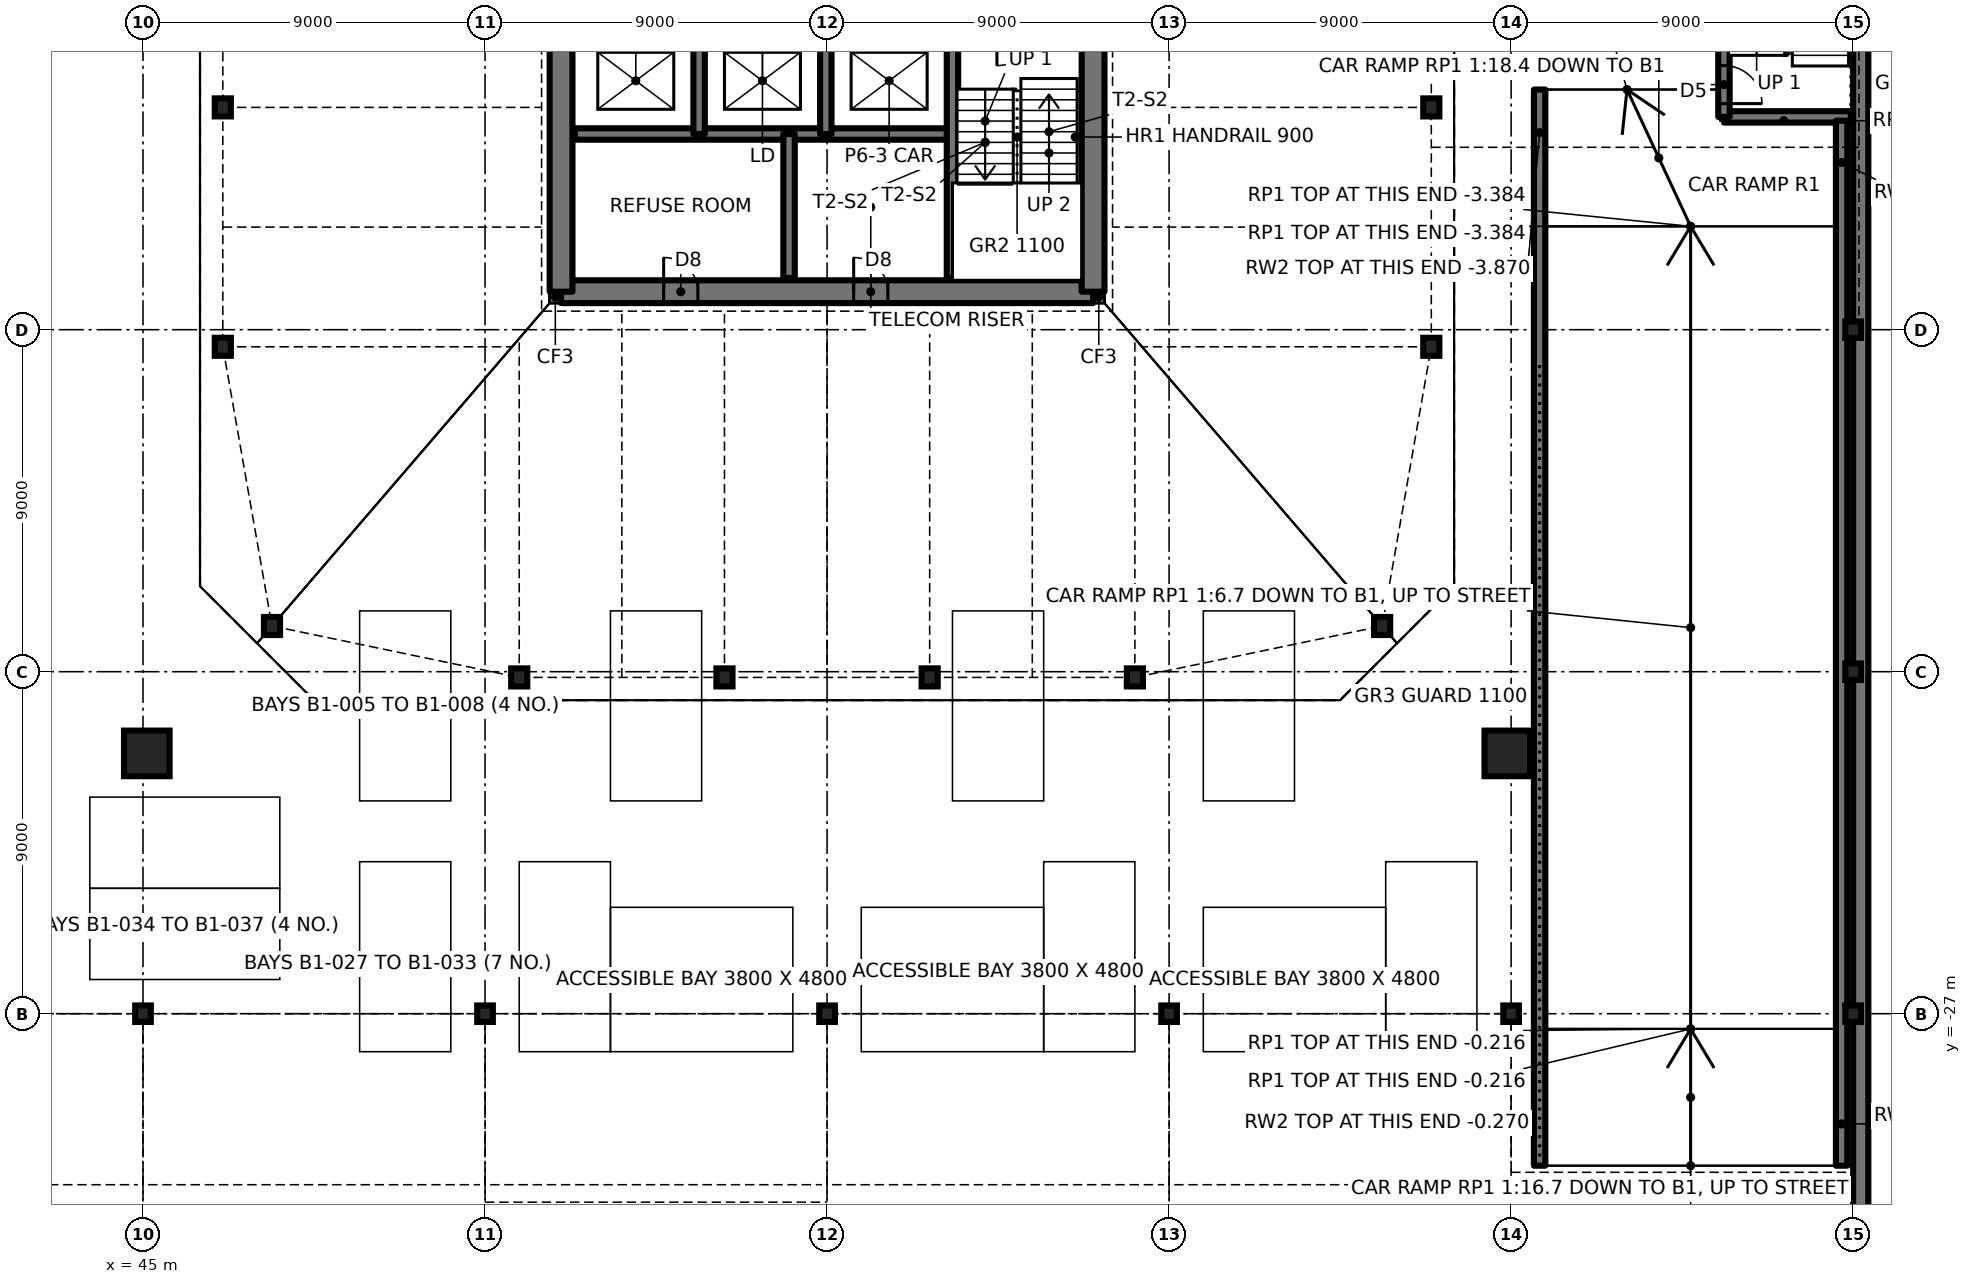
"""IFC4 building model, lengths in metres.
Left out: names, types, materials, properties, quantities, classifications, styles, units other than length and angle.
Written with IfcOpenShell. Run it as: python <this file> out.ifc"""

import sys

from ifc_helpers import new_model, si_unit, direction, frame, frame_2d, origin, origin_2d, place, context, subcontext, project, spatial, polyline, rectangle, hollow_rectangle, i_section, outline, extrude, element, fill, save


model = new_model("IFC4")
c1 = context("Model", 3, precision=1e-05, world=origin(), true_north=direction((0.0, 1.0)))
c2 = subcontext(c1, "Body", "Model", "MODEL_VIEW")
j1 = project(units=[si_unit("LENGTHUNIT", "METRE"), si_unit("PLANEANGLEUNIT", "RADIAN")], contexts=[c1])
p1 = place(None, origin())
s1 = spatial("IfcSite", under=j1, at=p1, CompositionType="ELEMENT")
p2 = place(p1, origin())
s2 = spatial("IfcBuilding", under=s1, at=p2, CompositionType="ELEMENT")
p3 = place(p2, frame((0.0, 0.0, -3.6)))
s3 = spatial("IfcBuildingStorey", under=s2, at=p3, CompositionType="ELEMENT", Elevation=-3.6)
for number, where, z_axis, x_axis in (
    (1, (48.394, -16.797, 0.0), (0.0, 0.0, 1.0), (1.0, 0.0, 0.0)),
    (2, (54.9, -18.15, 0.0), (0.0, 0.0, 1.0), (1.0, 0.0, 0.0)),
    (3, (60.3, -18.15, 0.0), (0.0, 0.0, 1.0), (1.0, 0.0, 0.0)),
    (4, (65.7, -18.15, 0.0), (0.0, 0.0, 1.0), (1.0, 0.0, 0.0)),
    (5, (71.1, -18.15, 0.0), (0.0, 0.0, 1.0), (1.0, 0.0, 0.0)),
    (6, (77.606, -16.797, 0.0), (0.0, 0.0, 1.0), (1.0, 0.0, 0.0)),
    (7, (78.9, -9.45, 0.0), (0.0, 0.0, 1.0), (1.0, 0.0, 0.0)),
    (8, (78.9, -3.15, 0.0), (0.0, 0.0, 1.0), (1.0, 0.0, 0.0)),
    (9, (47.1, -3.15, 0.0), (0.0, 0.0, 1.0), (1.0, 0.0, 0.0)),
    (10, (47.1, -9.45, 0.0), (0.0, 0.0, 1.0), (1.0, 0.0, 0.0)),
):
    element("IfcColumn", number, at=place(p3, frame(where, z_axis=z_axis, x_axis=x_axis)), inside=s3, PredefinedType="COLUMN", context=c2, shape_type="SweptSolid", body=[
        extrude(i_section(OverallWidth=0.424, OverallDepth=0.475, WebThickness=0.048, FlangeThickness=0.077, at=origin_2d()), origin(), (0.0, 0.0, 1.0), 3.6),
    ])
for number, where, z_axis, x_axis in (
    (11, (45.1, -20.15, 0.0), (0.0, 0.0, 1.0), (1.0, 0.0, 0.0)),
    (12, (80.9, -20.15, 0.0), (0.0, 0.0, 1.0), (1.0, 0.0, 0.0)),
):
    element("IfcColumn", number, at=place(p3, frame(where, z_axis=z_axis, x_axis=x_axis)), inside=s3, PredefinedType="COLUMN", context=c2, shape_type="SweptSolid", body=[
        extrude(hollow_rectangle(XDim=1.2, YDim=1.2, WallThickness=0.07, at=origin_2d()), origin(), (0.0, 0.0, 1.0), 3.6),
    ])
for number, where, z_axis, x_axis in (
    (13, (45.0, -27.0, 0.0), (0.0, 0.0, 1.0), (1.0, 0.0, 0.0)),
    (14, (54.0, -27.0, 0.0), (0.0, 0.0, 1.0), (1.0, 0.0, 0.0)),
    (15, (63.0, -27.0, 0.0), (0.0, 0.0, 1.0), (1.0, 0.0, 0.0)),
    (16, (72.0, -27.0, 0.0), (0.0, 0.0, 1.0), (1.0, 0.0, 0.0)),
    (17, (81.0, -27.0, 0.0), (0.0, 0.0, 1.0), (1.0, 0.0, 0.0)),
    (18, (90.0, -27.0, 0.0), (0.0, 0.0, 1.0), (1.0, 0.0, 0.0)),
    (19, (90.0, -18.0, 0.0), (0.0, 0.0, 1.0), (1.0, 0.0, 0.0)),
    (20, (90.0, -9.0, 0.0), (0.0, 0.0, 1.0), (1.0, 0.0, 0.0)),
):
    element("IfcColumn", number, at=place(p3, frame(where, z_axis=z_axis, x_axis=x_axis)), inside=s3, PredefinedType="COLUMN", context=c2, shape_type="SweptSolid", body=[
        extrude(i_section(OverallWidth=0.411, OverallDepth=0.434, WebThickness=0.036, FlangeThickness=0.057, at=origin_2d()), origin(), (0.0, 0.0, 1.0), 3.6),
    ])
for number, where, z_axis, x_axis in (
    (21, (55.7, -8.15, 0.0), (0.0, 0.0, 1.0), (1.0, 0.0, 0.0)),
    (22, (70.0, -8.15, 0.0), (0.0, 0.0, 1.0), (1.0, 0.0, 0.0)),
):
    element("IfcWall", number, at=place(p3, frame(where, z_axis=z_axis, x_axis=x_axis)), inside=s3, PredefinedType="SOLIDWALL", context=c2, shape_type="SweptSolid", body=[
        extrude(rectangle(XDim=0.3, YDim=0.3, at=frame_2d((0.15, 0.0))), origin(), (0.0, 0.0, 1.0), 3.6),
    ])
p4 = place(p3, frame((56.0, -8.0, 0.0), z_axis=(0.0, 0.0, 1.0), x_axis=(1.0, 0.0, 0.0)))
e23 = element("IfcWall", 23, at=p4, inside=s3, PredefinedType="SHEAR", context=c2, shape_type="SweptSolid", body=[
    extrude(rectangle(XDim=14.0, YDim=0.6, at=frame_2d((7.0, 0.0))), origin(), (0.0, 0.0, 1.0), 3.6),
])
p5 = place(p4, frame((2.7, 0.0, 0.0)))
e24 = element("IfcOpeningElement", 24, at=p5, cuts=e23, PredefinedType="OPENING", context=c2, shape_type="SweptSolid", body=[
    extrude(rectangle(XDim=0.9, YDim=2.1, at=frame_2d((0.45, 1.05))), frame((0.0, 0.31, 0.0), z_axis=(0.0, -1.0, 0.0), x_axis=(1.0, 0.0, 0.0)), (0.0, 0.0, 1.0), 0.62),
])
p6 = place(p4, frame((7.7, 0.0, 0.0)))
e25 = element("IfcOpeningElement", 25, at=p6, cuts=e23, PredefinedType="OPENING", context=c2, shape_type="SweptSolid", body=[
    extrude(rectangle(XDim=0.9, YDim=2.1, at=frame_2d((0.45, 1.05))), frame((0.0, 0.31, 0.0), z_axis=(0.0, -1.0, 0.0), x_axis=(1.0, 0.0, 0.0)), (0.0, 0.0, 1.0), 0.62),
])
p7 = place(p3, frame((70.0, -8.0, 0.0), z_axis=(0.0, 0.0, 1.0), x_axis=(0.0, 1.0, 0.0)))
e26 = element("IfcWall", 26, at=p7, inside=s3, PredefinedType="SHEAR", context=c2, shape_type="SweptSolid", body=[
    extrude(rectangle(XDim=16.0, YDim=0.6, at=frame_2d((8.0, 0.0))), origin(), (0.0, 0.0, 1.0), 3.6),
])
p8 = place(p7, frame((7.5, 0.0, 0.0)))
e27 = element("IfcOpeningElement", 27, at=p8, cuts=e26, PredefinedType="OPENING", context=c2, shape_type="SweptSolid", body=[
    extrude(rectangle(XDim=1.0, YDim=2.1, at=frame_2d((0.5, 1.05))), frame((0.0, 0.31, 0.0), z_axis=(0.0, -1.0, 0.0), x_axis=(1.0, 0.0, 0.0)), (0.0, 0.0, 1.0), 0.62),
])
p9 = place(p3, frame((56.0, 8.0, 0.0), z_axis=(0.0, 0.0, 1.0), x_axis=(0.0, -1.0, 0.0)))
e28 = element("IfcWall", 28, at=p9, inside=s3, PredefinedType="SHEAR", context=c2, shape_type="SweptSolid", body=[
    extrude(rectangle(XDim=16.0, YDim=0.6, at=frame_2d((8.0, 0.0))), origin(), (0.0, 0.0, 1.0), 3.6),
])
p10 = place(p9, frame((7.5, 0.0, 0.0)))
e29 = element("IfcOpeningElement", 29, at=p10, cuts=e28, PredefinedType="OPENING", context=c2, shape_type="SweptSolid", body=[
    extrude(rectangle(XDim=1.0, YDim=2.1, at=frame_2d((0.5, 1.05))), frame((0.0, 0.31, 0.0), z_axis=(0.0, -1.0, 0.0), x_axis=(1.0, 0.0, 0.0)), (0.0, 0.0, 1.0), 0.62),
])
p11 = place(p3, frame((90.2, -35.8, 0.0), z_axis=(0.0, 0.0, 1.0), x_axis=(0.0, 1.0, 0.0)))
e30 = element("IfcWall", 30, at=p11, inside=s3, PredefinedType="SOLIDWALL", context=c2, shape_type="SweptSolid", body=[
    extrude(rectangle(XDim=71.6, YDim=0.4, at=frame_2d((35.8, 0.0))), origin(), (0.0, 0.0, 1.0), 2.581),
])
p12 = place(p3, frame((56.36, -3.85, 0.0), z_axis=(0.0, 0.0, 1.0), x_axis=(1.0, 0.0, 0.0)))
e31 = element("IfcWall", 31, at=p12, inside=s3, PredefinedType="SOLIDWALL", context=c2, shape_type="SweptSolid", body=[
    extrude(rectangle(XDim=9.94, YDim=0.3, at=frame_2d((4.97, 0.0))), origin(), (0.0, 0.0, 1.0), 3.6),
])
p13 = place(p3, frame((86.6, -3.4, 0.0), z_axis=(0.0, 0.0, 1.0), x_axis=(1.0, 0.0, 0.0)))
e32 = element("IfcWall", 32, at=p13, inside=s3, PredefinedType="SOLIDWALL", context=c2, shape_type="SweptSolid", body=[
    extrude(rectangle(XDim=3.34, YDim=0.3, at=frame_2d((1.67, 0.0))), origin(), (0.0, 0.0, 1.0), 3.6),
])
p14 = place(p3, frame((86.6, -3.4, 0.0), z_axis=(0.0, 0.0, 1.0), x_axis=(0.0, 1.0, 0.0)))
e33 = element("IfcWall", 33, at=p14, inside=s3, PredefinedType="SOLIDWALL", context=c2, shape_type="SweptSolid", body=[
    extrude(rectangle(XDim=7.4, YDim=0.3, at=frame_2d((3.7, 0.0))), origin(), (0.0, 0.0, 1.0), 3.6),
])
p15 = place(p14, frame((0.35, 0.0, 0.0)))
e34 = element("IfcOpeningElement", 34, at=p15, cuts=e33, PredefinedType="OPENING", context=c2, shape_type="SweptSolid", body=[
    extrude(rectangle(XDim=1.0, YDim=2.1, at=frame_2d((0.5, 1.05))), frame((0.0, 0.16, 0.0), z_axis=(0.0, -1.0, 0.0), x_axis=(1.0, 0.0, 0.0)), (0.0, 0.0, 1.0), 0.32),
])
p16 = place(p3, frame((66.3, -7.64, 0.0), z_axis=(0.0, 0.0, 1.0), x_axis=(0.0, 1.0, 0.0)))
e35 = element("IfcWall", 35, at=p16, inside=s3, PredefinedType="SOLIDWALL", context=c2, shape_type="SweptSolid", body=[
    extrude(rectangle(XDim=11.49, YDim=0.3, at=frame_2d((5.745, 0.0))), origin(), (0.0, 0.0, 1.0), 3.6),
])
p17 = place(p16, frame((7.04, 0.0, 0.0)))
e36 = element("IfcOpeningElement", 36, at=p17, cuts=e35, PredefinedType="OPENING", context=c2, shape_type="SweptSolid", body=[
    extrude(rectangle(XDim=1.2, YDim=2.1, at=frame_2d((0.6, 1.05))), frame((0.0, 0.16, 0.0), z_axis=(0.0, -1.0, 0.0), x_axis=(1.0, 0.0, 0.0)), (0.0, 0.0, 1.0), 0.32),
])
p18 = place(p3, frame((62.967, -3.85, 0.0), z_axis=(0.0, 0.0, 1.0), x_axis=(0.0, 1.0, 0.0)))
e37 = element("IfcWall", 37, at=p18, inside=s3, PredefinedType="SOLIDWALL", context=c2, shape_type="SweptSolid", body=[
    extrude(rectangle(XDim=2.8, YDim=0.3, at=frame_2d((1.4, 0.0))), origin(), (0.0, 0.0, 1.0), 3.6),
])
p19 = place(p3, frame((62.0, -7.64, 0.0), z_axis=(0.0, 0.0, 1.0), x_axis=(0.0, 1.0, 0.0)))
e38 = element("IfcWall", 38, at=p19, inside=s3, PredefinedType="SOLIDWALL", context=c2, shape_type="SweptSolid", body=[
    extrude(rectangle(XDim=3.79, YDim=0.3, at=frame_2d((1.895, 0.0))), origin(), (0.0, 0.0, 1.0), 3.6),
])
p20 = place(p3, frame((59.633, -3.85, 0.0), z_axis=(0.0, 0.0, 1.0), x_axis=(0.0, 1.0, 0.0)))
e39 = element("IfcWall", 39, at=p20, inside=s3, PredefinedType="SOLIDWALL", context=c2, shape_type="SweptSolid", body=[
    extrude(rectangle(XDim=2.8, YDim=0.3, at=frame_2d((1.4, 0.0))), origin(), (0.0, 0.0, 1.0), 3.6),
])
p21 = place(p3, frame((81.75, -31.0, -3.85), z_axis=(0.0, 0.0, 1.0), x_axis=(0.0, 1.0, 0.0)))
e40 = element("IfcWall", 40, at=p21, inside=s3, PredefinedType="SOLIDWALL", context=c2, shape_type="SweptSolid", body=[
    extrude(outline(polyline([(0.0, 0.0), (28.32, 0.0), (28.32, 3.58), (24.72, 3.796), (3.6, 6.964), (0.0, 7.18), (0.0, 0.0)])), frame((0.0, 0.15, 0.0), z_axis=(0.0, -1.0, 0.0), x_axis=(1.0, 0.0, 0.0)), (0.0, 0.0, 1.0), 0.3),
])
p22 = place(p3, frame((89.697, -31.0, -3.85), z_axis=(0.0, 0.0, 1.0), x_axis=(0.0, 1.0, 0.0)))
e41 = element("IfcWall", 41, at=p22, inside=s3, PredefinedType="SOLIDWALL", context=c2, shape_type="SweptSolid", body=[
    extrude(outline(polyline([(0.0, 0.0), (27.5, 0.0), (27.5, 3.629), (24.72, 3.796), (3.6, 6.964), (0.0, 7.18), (0.0, 0.0)])), frame((0.0, 0.15, 0.0), z_axis=(0.0, -1.0, 0.0), x_axis=(1.0, 0.0, 0.0)), (0.0, 0.0, 1.0), 0.3),
])
p23 = place(p15, frame((1.0, 0.0, 0.0), z_axis=(0.0, 0.0, 1.0), x_axis=(-1.0, 0.0, 0.0)))
e42 = element("IfcDoor", 42, at=p23, inside=s3, OperationType="SINGLE_SWING_RIGHT", PredefinedType="DOOR", context=c2, shape_type="SweptSolid", body=[
    extrude(rectangle(XDim=1.0, YDim=2.1, at=frame_2d((0.5, 1.05))), frame((0.0, 0.025, 0.0), z_axis=(0.0, -1.0, 0.0), x_axis=(1.0, 0.0, 0.0)), (0.0, 0.0, 1.0), 0.05),
])
fill(e34, e42)
p24 = place(p5, origin())
e43 = element("IfcDoor", 43, at=p24, inside=s3, OperationType="SINGLE_SWING_LEFT", PredefinedType="DOOR", context=c2, shape_type="SweptSolid", body=[
    extrude(rectangle(XDim=0.9, YDim=2.1, at=frame_2d((0.45, 1.05))), frame((0.0, 0.025, 0.0), z_axis=(0.0, -1.0, 0.0), x_axis=(1.0, 0.0, 0.0)), (0.0, 0.0, 1.0), 0.05),
])
fill(e24, e43)
p25 = place(p6, origin())
e44 = element("IfcDoor", 44, at=p25, inside=s3, OperationType="SINGLE_SWING_LEFT", PredefinedType="DOOR", context=c2, shape_type="SweptSolid", body=[
    extrude(rectangle(XDim=0.9, YDim=2.1, at=frame_2d((0.45, 1.05))), frame((0.0, 0.025, 0.0), z_axis=(0.0, -1.0, 0.0), x_axis=(1.0, 0.0, 0.0)), (0.0, 0.0, 1.0), 0.05),
])
fill(e25, e44)
save(model, sys.argv[1])
